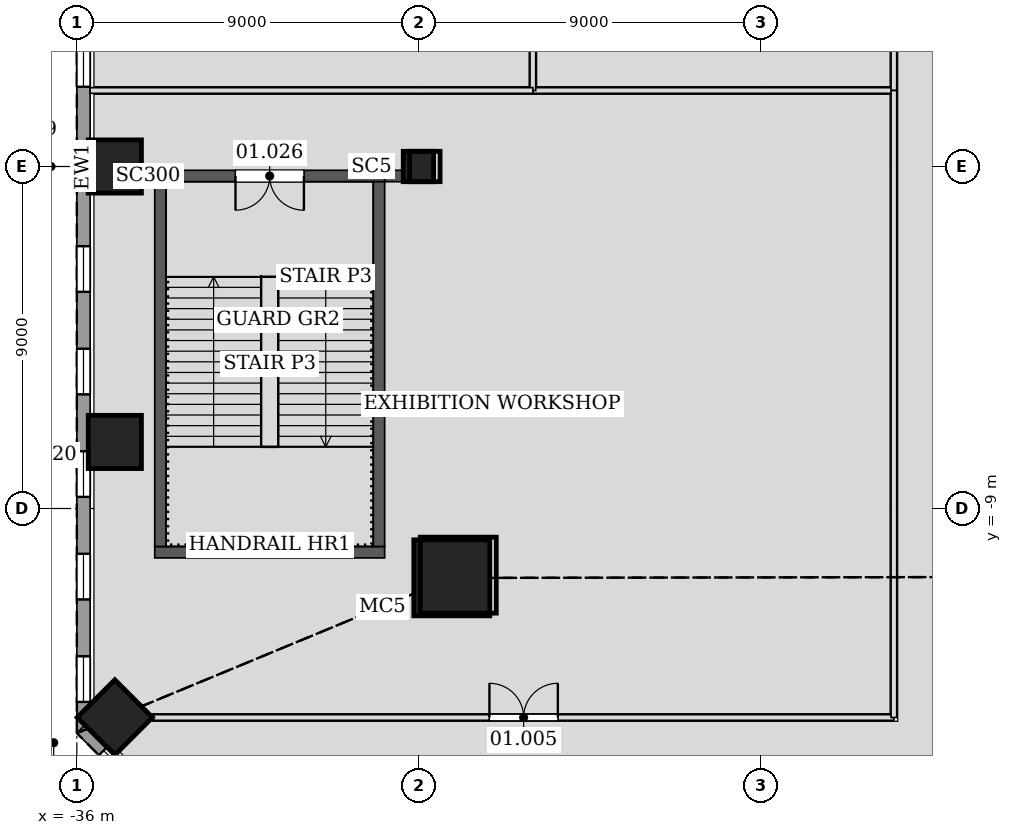
"""IFC4 building model, lengths in metres.
Left out: names, types, materials, properties, quantities, classifications, styles, units other than length and angle.
Written with IfcOpenShell. Run it as: python <this file> out.ifc"""

import sys

from ifc_helpers import new_model, si_unit, direction, frame, frame_2d, origin, origin_2d, place, context, subcontext, project, spatial, rectangle, hollow_rectangle, extrude, element, fill, save


model = new_model("IFC4")
c1 = context("Model", 3, precision=1e-05, world=origin(), true_north=direction((0.0, 1.0)))
c2 = subcontext(c1, "Body", "Model", "MODEL_VIEW")
j1 = project(units=[si_unit("LENGTHUNIT", "METRE"), si_unit("PLANEANGLEUNIT", "RADIAN")], contexts=[c1])
p1 = place(None, origin())
s1 = spatial("IfcSite", under=j1, at=p1, CompositionType="ELEMENT")
p2 = place(p1, origin())
s2 = spatial("IfcBuilding", under=s1, at=p2, CompositionType="ELEMENT")
p3 = place(p2, frame((0.0, 0.0, 7.2)))
s3 = spatial("IfcBuildingStorey", under=s2, at=p3, CompositionType="ELEMENT", Elevation=7.2)
p4 = place(p3, frame((-26.133, -10.824, 0.0), z_axis=(0.028266381762, 0.011713263234, 0.999531795956), x_axis=(-0.38282136346, 0.923822387517, 0.0)))
e1 = element("IfcColumn", 1, at=p4, inside=s3, PredefinedType="COLUMN", context=c2, shape_type="SweptSolid", body=[
    extrude(hollow_rectangle(XDim=2.0, YDim=2.0, WallThickness=0.09, at=origin_2d()), origin(), (0.0, 0.0, 1.0), 6.003),
])
p5 = place(p3, frame((-27.011, 0.0, 0.0), z_axis=(0.028268321043, 0.0, 0.999600371161), x_axis=(0.0, 1.0, 0.0)))
e2 = element("IfcColumn", 2, at=p5, inside=s3, PredefinedType="COLUMN", context=c2, shape_type="SweptSolid", body=[
    extrude(hollow_rectangle(XDim=0.8, YDim=0.8, WallThickness=0.05, at=origin_2d()), origin(), (0.0, 0.0, 1.0), 6.002),
])
for number, where, z_axis, x_axis in (
    (3, (-35.0, 0.0, 0.0), (0.0, 0.0, 1.0), (1.0, 0.0, 0.0)),
    (4, (-35.0, -7.249, 0.0), (0.0, 0.0, 1.0), (1.0, 0.0, 0.0)),
    (5, (-35.0, -14.498, 0.0), (0.0, 0.0, 1.0), (0.707, 0.707, 0.0)),
):
    element("IfcColumn", number, at=place(p3, frame(where, z_axis=z_axis, x_axis=x_axis)), inside=s3, PredefinedType="COLUMN", context=c2, shape_type="SweptSolid", body=[
        extrude(rectangle(XDim=1.4, YDim=1.4, at=origin_2d()), origin(), (0.0, 0.0, 1.0), 6.0),
    ])
p6 = place(p3, frame((-33.95, -10.15, 0.0), z_axis=(0.0, 0.0, 1.0), x_axis=(1.0, 0.0, 0.0)))
e6 = element("IfcWall", 6, at=p6, inside=s3, PredefinedType="SOLIDWALL", context=c2, shape_type="SweptSolid", body=[
    extrude(rectangle(XDim=6.05, YDim=0.3, at=frame_2d((3.025, 0.0))), origin(), (0.0, 0.0, 1.0), 6.0),
])
p7 = place(p3, frame((-27.9, -0.25, 0.0), z_axis=(0.0, 0.0, 1.0), x_axis=(-1.0, 0.0, 0.0)))
e7 = element("IfcWall", 7, at=p7, inside=s3, PredefinedType="SOLIDWALL", context=c2, shape_type="SweptSolid", body=[
    extrude(rectangle(XDim=6.05, YDim=0.3, at=frame_2d((3.025, 0.0))), origin(), (0.0, 0.0, 1.0), 6.0),
])
p8 = place(p7, frame((2.125, 0.0, 0.0)))
e8 = element("IfcOpeningElement", 8, at=p8, cuts=e7, PredefinedType="OPENING", context=c2, shape_type="SweptSolid", body=[
    extrude(rectangle(XDim=1.8, YDim=2.1, at=frame_2d((0.9, 1.05))), frame((0.0, 0.16, 0.0), z_axis=(0.0, -1.0, 0.0), x_axis=(1.0, 0.0, 0.0)), (0.0, 0.0, 1.0), 0.32),
])
p9 = place(p3, frame((-27.9, -0.25, 0.0), z_axis=(0.0, 0.0, 1.0), x_axis=(1.0, 0.0, 0.0)))
e9 = element("IfcWall", 9, at=p9, inside=s3, PredefinedType="SOLIDWALL", context=c2, shape_type="SweptSolid", body=[
    extrude(rectangle(XDim=0.489, YDim=0.3, at=frame_2d((0.245, 0.0))), origin(), (0.0, 0.0, 1.0), 5.344),
])
p10 = place(p3, frame((-33.95, -0.25, 0.0), z_axis=(0.0, 0.0, 1.0), x_axis=(-1.0, 0.0, 0.0)))
e10 = element("IfcWall", 10, at=p10, inside=s3, PredefinedType="SOLIDWALL", context=c2, shape_type="SweptSolid", body=[
    extrude(rectangle(XDim=0.35, YDim=0.3, at=frame_2d((0.175, 0.0))), origin(), (0.0, 0.0, 1.0), 5.344),
])
for number, where, z_axis, x_axis in (
    (11, (-33.8, -0.4, 0.0), (0.0, 0.0, 1.0), (0.0, -1.0, 0.0)),
    (12, (-28.05, -10.0, 0.0), (0.0, 0.0, 1.0), (0.0, 1.0, 0.0)),
):
    element("IfcWall", number, at=place(p3, frame(where, z_axis=z_axis, x_axis=x_axis)), inside=s3, PredefinedType="SOLIDWALL", context=c2, shape_type="SweptSolid", body=[
        extrude(rectangle(XDim=9.6, YDim=0.3, at=frame_2d((4.8, 0.0))), origin(), (0.0, 0.0, 1.0), 6.0),
    ])
p11 = place(p3, frame((-35.825, 14.912, 0.0), z_axis=(0.0, 0.0, 1.0), x_axis=(0.0, -1.0, 0.0)))
e13 = element("IfcWall", 13, at=p11, inside=s3, PredefinedType="SOLIDWALL", context=c2, shape_type="SweptSolid", body=[
    extrude(rectangle(XDim=29.823, YDim=0.35, at=frame_2d((14.912, 0.0))), origin(), (0.0, 0.0, 1.0), 5.7),
])
p12 = place(p11, frame((0.822, 0.0, 0.9)))
e14 = element("IfcOpeningElement", 14, at=p12, cuts=e13, PredefinedType="OPENING", context=c2, shape_type="SweptSolid", body=[
    extrude(rectangle(XDim=1.2, YDim=4.2, at=frame_2d((0.6, 2.1))), frame((0.0, 0.185, 0.0), z_axis=(0.0, -1.0, 0.0), x_axis=(1.0, 0.0, 0.0)), (0.0, 0.0, 1.0), 0.37),
])
p13 = place(p11, frame((3.52, 0.0, 0.9)))
e15 = element("IfcOpeningElement", 15, at=p13, cuts=e13, PredefinedType="OPENING", context=c2, shape_type="SweptSolid", body=[
    extrude(rectangle(XDim=1.2, YDim=4.2, at=frame_2d((0.6, 2.1))), frame((0.0, 0.185, 0.0), z_axis=(0.0, -1.0, 0.0), x_axis=(1.0, 0.0, 0.0)), (0.0, 0.0, 1.0), 0.37),
])
p14 = place(p11, frame((6.218, 0.0, 0.9)))
e16 = element("IfcOpeningElement", 16, at=p14, cuts=e13, PredefinedType="OPENING", context=c2, shape_type="SweptSolid", body=[
    extrude(rectangle(XDim=1.2, YDim=4.2, at=frame_2d((0.6, 2.1))), frame((0.0, 0.185, 0.0), z_axis=(0.0, -1.0, 0.0), x_axis=(1.0, 0.0, 0.0)), (0.0, 0.0, 1.0), 0.37),
])
p15 = place(p11, frame((8.916, 0.0, 0.9)))
e17 = element("IfcOpeningElement", 17, at=p15, cuts=e13, PredefinedType="OPENING", context=c2, shape_type="SweptSolid", body=[
    extrude(rectangle(XDim=1.2, YDim=4.2, at=frame_2d((0.6, 2.1))), frame((0.0, 0.185, 0.0), z_axis=(0.0, -1.0, 0.0), x_axis=(1.0, 0.0, 0.0)), (0.0, 0.0, 1.0), 0.37),
])
p16 = place(p11, frame((11.614, 0.0, 0.9)))
e18 = element("IfcOpeningElement", 18, at=p16, cuts=e13, PredefinedType="OPENING", context=c2, shape_type="SweptSolid", body=[
    extrude(rectangle(XDim=1.2, YDim=4.2, at=frame_2d((0.6, 2.1))), frame((0.0, 0.185, 0.0), z_axis=(0.0, -1.0, 0.0), x_axis=(1.0, 0.0, 0.0)), (0.0, 0.0, 1.0), 0.37),
])
p17 = place(p11, frame((14.312, 0.0, 0.9)))
e19 = element("IfcOpeningElement", 19, at=p17, cuts=e13, PredefinedType="OPENING", context=c2, shape_type="SweptSolid", body=[
    extrude(rectangle(XDim=1.2, YDim=4.2, at=frame_2d((0.6, 2.1))), frame((0.0, 0.185, 0.0), z_axis=(0.0, -1.0, 0.0), x_axis=(1.0, 0.0, 0.0)), (0.0, 0.0, 1.0), 0.37),
])
p18 = place(p11, frame((17.01, 0.0, 0.9)))
e20 = element("IfcOpeningElement", 20, at=p18, cuts=e13, PredefinedType="OPENING", context=c2, shape_type="SweptSolid", body=[
    extrude(rectangle(XDim=1.2, YDim=4.2, at=frame_2d((0.6, 2.1))), frame((0.0, 0.185, 0.0), z_axis=(0.0, -1.0, 0.0), x_axis=(1.0, 0.0, 0.0)), (0.0, 0.0, 1.0), 0.37),
])
p19 = place(p11, frame((19.708, 0.0, 0.9)))
e21 = element("IfcOpeningElement", 21, at=p19, cuts=e13, PredefinedType="OPENING", context=c2, shape_type="SweptSolid", body=[
    extrude(rectangle(XDim=1.2, YDim=4.2, at=frame_2d((0.6, 2.1))), frame((0.0, 0.185, 0.0), z_axis=(0.0, -1.0, 0.0), x_axis=(1.0, 0.0, 0.0)), (0.0, 0.0, 1.0), 0.37),
])
p20 = place(p11, frame((22.406, 0.0, 0.9)))
e22 = element("IfcOpeningElement", 22, at=p20, cuts=e13, PredefinedType="OPENING", context=c2, shape_type="SweptSolid", body=[
    extrude(rectangle(XDim=1.2, YDim=4.2, at=frame_2d((0.6, 2.1))), frame((0.0, 0.185, 0.0), z_axis=(0.0, -1.0, 0.0), x_axis=(1.0, 0.0, 0.0)), (0.0, 0.0, 1.0), 0.37),
])
p21 = place(p11, frame((25.104, 0.0, 0.9)))
e23 = element("IfcOpeningElement", 23, at=p21, cuts=e13, PredefinedType="OPENING", context=c2, shape_type="SweptSolid", body=[
    extrude(rectangle(XDim=1.2, YDim=4.2, at=frame_2d((0.6, 2.1))), frame((0.0, 0.185, 0.0), z_axis=(0.0, -1.0, 0.0), x_axis=(1.0, 0.0, 0.0)), (0.0, 0.0, 1.0), 0.37),
])
p22 = place(p11, frame((27.802, 0.0, 0.9)))
e24 = element("IfcOpeningElement", 24, at=p22, cuts=e13, PredefinedType="OPENING", context=c2, shape_type="SweptSolid", body=[
    extrude(rectangle(XDim=1.2, YDim=4.2, at=frame_2d((0.6, 2.1))), frame((0.0, 0.185, 0.0), z_axis=(0.0, -1.0, 0.0), x_axis=(1.0, 0.0, 0.0)), (0.0, 0.0, 1.0), 0.37),
])
p23 = place(p3, frame((-35.876, -14.788, 0.0), z_axis=(0.0, 0.0, 1.0), x_axis=(0.707106781187, -0.707106781187, 0.0)))
e25 = element("IfcWall", 25, at=p23, inside=s3, PredefinedType="SOLIDWALL", context=c2, shape_type="SweptSolid", body=[
    extrude(rectangle(XDim=29.823, YDim=0.35, at=frame_2d((14.912, 0.0))), origin(), (0.0, 0.0, 1.0), 5.7),
])
p24 = place(p23, frame((0.822, 0.0, 0.9)))
e26 = element("IfcOpeningElement", 26, at=p24, cuts=e25, PredefinedType="OPENING", context=c2, shape_type="SweptSolid", body=[
    extrude(rectangle(XDim=1.2, YDim=4.2, at=frame_2d((0.6, 2.1))), frame((0.0, 0.185, 0.0), z_axis=(0.0, -1.0, 0.0), x_axis=(1.0, 0.0, 0.0)), (0.0, 0.0, 1.0), 0.37),
])
p25 = place(p23, frame((3.52, 0.0, 0.9)))
e27 = element("IfcOpeningElement", 27, at=p25, cuts=e25, PredefinedType="OPENING", context=c2, shape_type="SweptSolid", body=[
    extrude(rectangle(XDim=1.2, YDim=4.2, at=frame_2d((0.6, 2.1))), frame((0.0, 0.185, 0.0), z_axis=(0.0, -1.0, 0.0), x_axis=(1.0, 0.0, 0.0)), (0.0, 0.0, 1.0), 0.37),
])
p26 = place(p23, frame((6.218, 0.0, 0.9)))
e28 = element("IfcOpeningElement", 28, at=p26, cuts=e25, PredefinedType="OPENING", context=c2, shape_type="SweptSolid", body=[
    extrude(rectangle(XDim=1.2, YDim=4.2, at=frame_2d((0.6, 2.1))), frame((0.0, 0.185, 0.0), z_axis=(0.0, -1.0, 0.0), x_axis=(1.0, 0.0, 0.0)), (0.0, 0.0, 1.0), 0.37),
])
p27 = place(p23, frame((8.916, 0.0, 0.9)))
e29 = element("IfcOpeningElement", 29, at=p27, cuts=e25, PredefinedType="OPENING", context=c2, shape_type="SweptSolid", body=[
    extrude(rectangle(XDim=1.2, YDim=4.2, at=frame_2d((0.6, 2.1))), frame((0.0, 0.185, 0.0), z_axis=(0.0, -1.0, 0.0), x_axis=(1.0, 0.0, 0.0)), (0.0, 0.0, 1.0), 0.37),
])
p28 = place(p23, frame((11.614, 0.0, 0.9)))
e30 = element("IfcOpeningElement", 30, at=p28, cuts=e25, PredefinedType="OPENING", context=c2, shape_type="SweptSolid", body=[
    extrude(rectangle(XDim=1.2, YDim=4.2, at=frame_2d((0.6, 2.1))), frame((0.0, 0.185, 0.0), z_axis=(0.0, -1.0, 0.0), x_axis=(1.0, 0.0, 0.0)), (0.0, 0.0, 1.0), 0.37),
])
p29 = place(p23, frame((14.312, 0.0, 0.9)))
e31 = element("IfcOpeningElement", 31, at=p29, cuts=e25, PredefinedType="OPENING", context=c2, shape_type="SweptSolid", body=[
    extrude(rectangle(XDim=1.2, YDim=4.2, at=frame_2d((0.6, 2.1))), frame((0.0, 0.185, 0.0), z_axis=(0.0, -1.0, 0.0), x_axis=(1.0, 0.0, 0.0)), (0.0, 0.0, 1.0), 0.37),
])
p30 = place(p23, frame((17.01, 0.0, 0.9)))
e32 = element("IfcOpeningElement", 32, at=p30, cuts=e25, PredefinedType="OPENING", context=c2, shape_type="SweptSolid", body=[
    extrude(rectangle(XDim=1.2, YDim=4.2, at=frame_2d((0.6, 2.1))), frame((0.0, 0.185, 0.0), z_axis=(0.0, -1.0, 0.0), x_axis=(1.0, 0.0, 0.0)), (0.0, 0.0, 1.0), 0.37),
])
p31 = place(p23, frame((19.708, 0.0, 0.9)))
e33 = element("IfcOpeningElement", 33, at=p31, cuts=e25, PredefinedType="OPENING", context=c2, shape_type="SweptSolid", body=[
    extrude(rectangle(XDim=1.2, YDim=4.2, at=frame_2d((0.6, 2.1))), frame((0.0, 0.185, 0.0), z_axis=(0.0, -1.0, 0.0), x_axis=(1.0, 0.0, 0.0)), (0.0, 0.0, 1.0), 0.37),
])
p32 = place(p23, frame((22.406, 0.0, 0.9)))
e34 = element("IfcOpeningElement", 34, at=p32, cuts=e25, PredefinedType="OPENING", context=c2, shape_type="SweptSolid", body=[
    extrude(rectangle(XDim=1.2, YDim=4.2, at=frame_2d((0.6, 2.1))), frame((0.0, 0.185, 0.0), z_axis=(0.0, -1.0, 0.0), x_axis=(1.0, 0.0, 0.0)), (0.0, 0.0, 1.0), 0.37),
])
p33 = place(p23, frame((25.104, 0.0, 0.9)))
e35 = element("IfcOpeningElement", 35, at=p33, cuts=e25, PredefinedType="OPENING", context=c2, shape_type="SweptSolid", body=[
    extrude(rectangle(XDim=1.2, YDim=4.2, at=frame_2d((0.6, 2.1))), frame((0.0, 0.185, 0.0), z_axis=(0.0, -1.0, 0.0), x_axis=(1.0, 0.0, 0.0)), (0.0, 0.0, 1.0), 0.37),
])
p34 = place(p23, frame((27.802, 0.0, 0.9)))
e36 = element("IfcOpeningElement", 36, at=p34, cuts=e25, PredefinedType="OPENING", context=c2, shape_type="SweptSolid", body=[
    extrude(rectangle(XDim=1.2, YDim=4.2, at=frame_2d((0.6, 2.1))), frame((0.0, 0.185, 0.0), z_axis=(0.0, -1.0, 0.0), x_axis=(1.0, 0.0, 0.0)), (0.0, 0.0, 1.0), 0.37),
])
p35 = place(p3, frame((-24.0, 2.0, 0.0), z_axis=(0.0, 0.0, 1.0), x_axis=(1.0, 0.0, 0.0)))
e37 = element("IfcWall", 37, at=p35, inside=s3, PredefinedType="PARTITIONING", context=c2, shape_type="SweptSolid", body=[
    extrude(rectangle(XDim=9.5, YDim=0.15, at=frame_2d((4.75, 0.0))), origin(), (0.0, 0.0, 1.0), 4.844),
])
p36 = place(p3, frame((-14.5, 2.0, 0.0), z_axis=(0.0, 0.0, 1.0), x_axis=(0.0, 1.0, 0.0)))
e38 = element("IfcWall", 38, at=p36, inside=s3, PredefinedType="PARTITIONING", context=c2, shape_type="SweptSolid", body=[
    extrude(rectangle(XDim=4.25, YDim=0.15, at=frame_2d((2.125, 0.0))), origin(), (0.0, 0.0, 1.0), 5.7),
])
p37 = place(p36, frame((1.675, 0.0, 0.0)))
e39 = element("IfcOpeningElement", 39, at=p37, cuts=e38, PredefinedType="OPENING", context=c2, shape_type="SweptSolid", body=[
    extrude(rectangle(XDim=0.9, YDim=2.1, at=frame_2d((0.45, 1.05))), frame((0.0, 0.085, 0.0), z_axis=(0.0, -1.0, 0.0), x_axis=(1.0, 0.0, 0.0)), (0.0, 0.0, 1.0), 0.17),
])
p38 = place(p3, frame((-24.0, 6.25, 0.0), z_axis=(0.0, 0.0, 1.0), x_axis=(0.0, -1.0, 0.0)))
e40 = element("IfcWall", 40, at=p38, inside=s3, PredefinedType="PARTITIONING", context=c2, shape_type="SweptSolid", body=[
    extrude(rectangle(XDim=4.25, YDim=0.15, at=frame_2d((2.125, 0.0))), origin(), (0.0, 0.0, 1.0), 4.832),
])
p39 = place(p3, frame((-33.986, -14.5, 0.0), z_axis=(0.0, 0.0, 1.0), x_axis=(1.0, 0.0, 0.0)))
e41 = element("IfcWall", 41, at=p39, inside=s3, PredefinedType="PARTITIONING", context=c2, shape_type="SweptSolid", body=[
    extrude(rectangle(XDim=19.486, YDim=0.15, at=frame_2d((9.743, 0.0))), origin(), (0.0, 0.0, 1.0), 4.59),
])
p40 = place(p39, frame((8.843, 0.0, 0.0)))
e42 = element("IfcOpeningElement", 42, at=p40, cuts=e41, PredefinedType="OPENING", context=c2, shape_type="SweptSolid", body=[
    extrude(rectangle(XDim=1.8, YDim=2.4, at=frame_2d((0.9, 1.2))), frame((0.0, 0.085, 0.0), z_axis=(0.0, -1.0, 0.0), x_axis=(1.0, 0.0, 0.0)), (0.0, 0.0, 1.0), 0.17),
])
p41 = place(p3, frame((-14.5, -14.5, 0.0), z_axis=(0.0, 0.0, 1.0), x_axis=(0.0, 1.0, 0.0)))
e43 = element("IfcWall", 43, at=p41, inside=s3, PredefinedType="PARTITIONING", context=c2, shape_type="SweptSolid", body=[
    extrude(rectangle(XDim=16.5, YDim=0.15, at=frame_2d((8.25, 0.0))), origin(), (0.0, 0.0, 1.0), 4.39),
])
p42 = place(p3, frame((-23.999, 2.0, 0.0), z_axis=(0.0, 0.0, 1.0), x_axis=(-1.0, 0.0, 0.0)))
e44 = element("IfcWall", 44, at=p42, inside=s3, PredefinedType="PARTITIONING", context=c2, shape_type="SweptSolid", body=[
    extrude(rectangle(XDim=11.651, YDim=0.15, at=frame_2d((5.825, 0.0))), origin(), (0.0, 0.0, 1.0), 4.679),
])
p43 = place(p16, origin())
e45 = element("IfcWindow", 45, at=p43, inside=s3, PartitioningType="SINGLE_PANEL", PredefinedType="WINDOW", context=c2, shape_type="SweptSolid", body=[
    extrude(rectangle(XDim=1.2, YDim=4.2, at=frame_2d((0.6, 2.1))), frame((0.0, 0.03, 0.0), z_axis=(0.0, -1.0, 0.0), x_axis=(1.0, 0.0, 0.0)), (0.0, 0.0, 1.0), 0.06),
])
fill(e18, e45)
p44 = place(p17, origin())
e46 = element("IfcWindow", 46, at=p44, inside=s3, PartitioningType="SINGLE_PANEL", PredefinedType="WINDOW", context=c2, shape_type="SweptSolid", body=[
    extrude(rectangle(XDim=1.2, YDim=4.2, at=frame_2d((0.6, 2.1))), frame((0.0, 0.03, 0.0), z_axis=(0.0, -1.0, 0.0), x_axis=(1.0, 0.0, 0.0)), (0.0, 0.0, 1.0), 0.06),
])
fill(e19, e46)
p45 = place(p18, origin())
e47 = element("IfcWindow", 47, at=p45, inside=s3, PartitioningType="SINGLE_PANEL", PredefinedType="WINDOW", context=c2, shape_type="SweptSolid", body=[
    extrude(rectangle(XDim=1.2, YDim=4.2, at=frame_2d((0.6, 2.1))), frame((0.0, 0.03, 0.0), z_axis=(0.0, -1.0, 0.0), x_axis=(1.0, 0.0, 0.0)), (0.0, 0.0, 1.0), 0.06),
])
fill(e20, e47)
p46 = place(p19, origin())
e48 = element("IfcWindow", 48, at=p46, inside=s3, PartitioningType="SINGLE_PANEL", PredefinedType="WINDOW", context=c2, shape_type="SweptSolid", body=[
    extrude(rectangle(XDim=1.2, YDim=4.2, at=frame_2d((0.6, 2.1))), frame((0.0, 0.03, 0.0), z_axis=(0.0, -1.0, 0.0), x_axis=(1.0, 0.0, 0.0)), (0.0, 0.0, 1.0), 0.06),
])
fill(e21, e48)
p47 = place(p20, origin())
e49 = element("IfcWindow", 49, at=p47, inside=s3, PartitioningType="SINGLE_PANEL", PredefinedType="WINDOW", context=c2, shape_type="SweptSolid", body=[
    extrude(rectangle(XDim=1.2, YDim=4.2, at=frame_2d((0.6, 2.1))), frame((0.0, 0.03, 0.0), z_axis=(0.0, -1.0, 0.0), x_axis=(1.0, 0.0, 0.0)), (0.0, 0.0, 1.0), 0.06),
])
fill(e22, e49)
p48 = place(p21, origin())
e50 = element("IfcWindow", 50, at=p48, inside=s3, PartitioningType="SINGLE_PANEL", PredefinedType="WINDOW", context=c2, shape_type="SweptSolid", body=[
    extrude(rectangle(XDim=1.2, YDim=4.2, at=frame_2d((0.6, 2.1))), frame((0.0, 0.03, 0.0), z_axis=(0.0, -1.0, 0.0), x_axis=(1.0, 0.0, 0.0)), (0.0, 0.0, 1.0), 0.06),
])
fill(e23, e50)
p49 = place(p22, origin())
e51 = element("IfcWindow", 51, at=p49, inside=s3, PartitioningType="SINGLE_PANEL", PredefinedType="WINDOW", context=c2, shape_type="SweptSolid", body=[
    extrude(rectangle(XDim=1.2, YDim=4.2, at=frame_2d((0.6, 2.1))), frame((0.0, 0.03, 0.0), z_axis=(0.0, -1.0, 0.0), x_axis=(1.0, 0.0, 0.0)), (0.0, 0.0, 1.0), 0.06),
])
fill(e24, e51)
p50 = place(p24, origin())
e52 = element("IfcWindow", 52, at=p50, inside=s3, PartitioningType="SINGLE_PANEL", PredefinedType="WINDOW", context=c2, shape_type="SweptSolid", body=[
    extrude(rectangle(XDim=1.2, YDim=4.2, at=frame_2d((0.6, 2.1))), frame((0.0, 0.03, 0.0), z_axis=(0.0, -1.0, 0.0), x_axis=(1.0, 0.0, 0.0)), (0.0, 0.0, 1.0), 0.06),
])
fill(e26, e52)
p51 = place(p40, origin())
e53 = element("IfcDoor", 53, at=p51, inside=s3, OperationType="DOUBLE_DOOR_SINGLE_SWING", PredefinedType="DOOR", context=c2, shape_type="SweptSolid", body=[
    extrude(rectangle(XDim=1.8, YDim=2.4, at=frame_2d((0.9, 1.2))), frame((0.0, 0.025, 0.0), z_axis=(0.0, -1.0, 0.0), x_axis=(1.0, 0.0, 0.0)), (0.0, 0.0, 1.0), 0.05),
])
fill(e42, e53)
p52 = place(p8, origin())
e54 = element("IfcDoor", 54, at=p52, inside=s3, OperationType="DOUBLE_DOOR_SINGLE_SWING", PredefinedType="DOOR", context=c2, shape_type="SweptSolid", body=[
    extrude(rectangle(XDim=1.8, YDim=2.1, at=frame_2d((0.9, 1.05))), frame((0.0, 0.025, 0.0), z_axis=(0.0, -1.0, 0.0), x_axis=(1.0, 0.0, 0.0)), (0.0, 0.0, 1.0), 0.05),
])
fill(e8, e54)
save(model, sys.argv[1])
